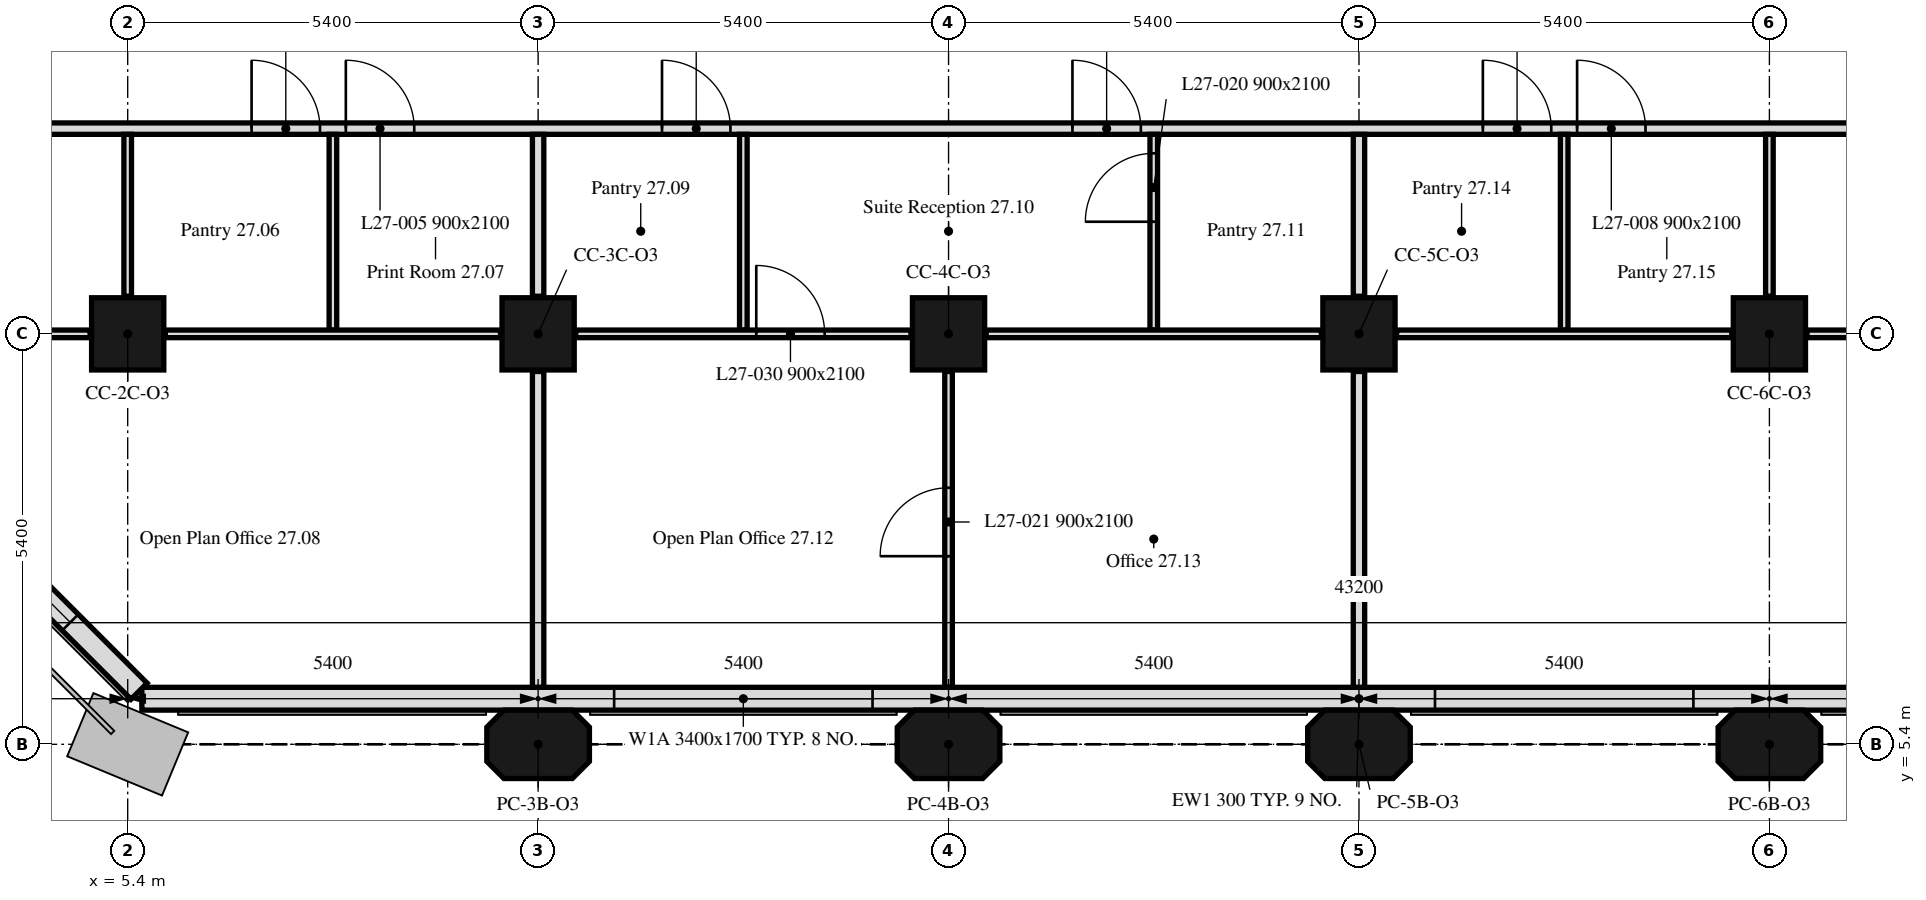
"""IFC4 building model, lengths in metres.
Left out: names, types, materials, properties, quantities, classifications, styles, units other than length and angle.
Written with IfcOpenShell. Run it as: python <this file> out.ifc"""

import sys

from ifc_helpers import new_model, si_unit, direction, frame, frame_2d, origin, origin_2d, place, context, subcontext, project, spatial, polyline, rectangle, outline, extrude, element, fill, save


model = new_model("IFC4")
c1 = context("Model", 3, precision=1e-05, world=origin(), true_north=direction((0.0, 1.0)))
c2 = subcontext(c1, "Body", "Model", "MODEL_VIEW")
j1 = project(units=[si_unit("LENGTHUNIT", "METRE"), si_unit("PLANEANGLEUNIT", "RADIAN")], contexts=[c1])
p1 = place(None, origin())
s1 = spatial("IfcSite", under=j1, at=p1, CompositionType="ELEMENT")
p2 = place(p1, origin())
s2 = spatial("IfcBuilding", under=s1, at=p2, CompositionType="ELEMENT")
p3 = place(p2, frame((0.0, 0.0, 114.4)))
s3 = spatial("IfcBuildingStorey", under=s2, at=p3, CompositionType="ELEMENT", Elevation=114.4)
for number, where, z_axis, x_axis in (
    (1, (10.8, 5.4, 0.0), (0.0, 0.0, 1.0), (1.0, 0.0, 0.0)),
    (2, (16.2, 5.4, 0.0), (0.0, 0.0, 1.0), (1.0, 0.0, 0.0)),
    (3, (21.6, 5.4, 0.0), (0.0, 0.0, 1.0), (1.0, 0.0, 0.0)),
    (4, (27.0, 5.4, 0.0), (0.0, 0.0, 1.0), (1.0, 0.0, 0.0)),
):
    element("IfcColumn", number, at=place(p3, frame(where, z_axis=z_axis, x_axis=x_axis)), inside=s3, PredefinedType="COLUMN", context=c2, shape_type="SweptSolid", body=[
        extrude(outline(polyline([(-0.45, -0.45), (0.45, -0.45), (0.675, -0.225), (0.675, 0.225), (0.45, 0.45), (-0.45, 0.45), (-0.675, 0.225), (-0.675, -0.225), (-0.45, -0.45)])), origin(), (0.0, 0.0, 1.0), 3.5),
    ])
for number, where, z_axis, x_axis in (
    (5, (5.4, 10.8, 0.0), (0.0, 0.0, 1.0), (1.0, 0.0, 0.0)),
    (6, (10.8, 10.8, 0.0), (0.0, 0.0, 1.0), (1.0, 0.0, 0.0)),
    (7, (16.2, 10.8, 0.0), (0.0, 0.0, 1.0), (1.0, 0.0, 0.0)),
    (8, (21.6, 10.8, 0.0), (0.0, 0.0, 1.0), (1.0, 0.0, 0.0)),
    (9, (27.0, 10.8, 0.0), (0.0, 0.0, 1.0), (1.0, 0.0, 0.0)),
):
    element("IfcColumn", number, at=place(p3, frame(where, z_axis=z_axis, x_axis=x_axis)), inside=s3, PredefinedType="COLUMN", context=c2, shape_type="SweptSolid", body=[
        extrude(rectangle(XDim=0.95, YDim=0.95, at=origin_2d()), origin(), (0.0, 0.0, 1.0), 3.5),
    ])
p4 = place(p3, frame((5.586, 6.0, 0.0), z_axis=(0.0, 0.0, 1.0), x_axis=(1.0, 0.0, 0.0)))
e10 = element("IfcWall", 10, at=p4, inside=s3, PredefinedType="SOLIDWALL", context=c2, shape_type="SweptSolid", body=[
    extrude(rectangle(XDim=32.027, YDim=0.3, at=frame_2d((16.014, 0.0))), origin(), (0.0, 0.0, 1.0), 3.5),
])
p5 = place(p4, frame((6.214, 0.0, 0.9)))
e11 = element("IfcOpeningElement", 11, at=p5, cuts=e10, PredefinedType="OPENING", context=c2, shape_type="SweptSolid", body=[
    extrude(rectangle(XDim=3.4, YDim=1.7, at=frame_2d((1.7, 0.85))), frame((0.0, 0.16, 0.0), z_axis=(0.0, -1.0, 0.0), x_axis=(1.0, 0.0, 0.0)), (0.0, 0.0, 1.0), 0.32),
])
p6 = place(p4, frame((17.014, 0.0, 0.9)))
e12 = element("IfcOpeningElement", 12, at=p6, cuts=e10, PredefinedType="OPENING", context=c2, shape_type="SweptSolid", body=[
    extrude(rectangle(XDim=3.4, YDim=1.7, at=frame_2d((1.7, 0.85))), frame((0.0, 0.16, 0.0), z_axis=(0.0, -1.0, 0.0), x_axis=(1.0, 0.0, 0.0)), (0.0, 0.0, 1.0), 0.32),
])
p7 = place(p4, frame((27.814, 0.0, 0.9)))
e13 = element("IfcOpeningElement", 13, at=p7, cuts=e10, PredefinedType="OPENING", context=c2, shape_type="SweptSolid", body=[
    extrude(rectangle(XDim=3.4, YDim=1.7, at=frame_2d((1.7, 0.85))), frame((0.0, 0.16, 0.0), z_axis=(0.0, -1.0, 0.0), x_axis=(1.0, 0.0, 0.0)), (0.0, 0.0, 1.0), 0.32),
])
p8 = place(p3, frame((0.699, 10.949, 0.0), z_axis=(0.0, 0.0, 1.0), x_axis=(0.707106781187, -0.707106781187, 0.0)))
e14 = element("IfcWall", 14, at=p8, inside=s3, PredefinedType="SOLIDWALL", context=c2, shape_type="SweptSolid", body=[
    extrude(rectangle(XDim=6.86, YDim=0.3, at=frame_2d((3.43, 0.0))), origin(), (0.0, 0.0, 1.0), 3.5),
])
p9 = place(p8, frame((1.28, 0.0, 0.9)))
e15 = element("IfcOpeningElement", 15, at=p9, cuts=e14, PredefinedType="OPENING", context=c2, shape_type="SweptSolid", body=[
    extrude(rectangle(XDim=1.1, YDim=1.7, at=frame_2d((0.55, 0.85))), frame((0.0, 0.16, 0.0), z_axis=(0.0, -1.0, 0.0), x_axis=(1.0, 0.0, 0.0)), (0.0, 0.0, 1.0), 0.32),
])
p10 = place(p8, frame((4.48, 0.0, 0.9)))
e16 = element("IfcOpeningElement", 16, at=p10, cuts=e14, PredefinedType="OPENING", context=c2, shape_type="SweptSolid", body=[
    extrude(rectangle(XDim=1.1, YDim=1.7, at=frame_2d((0.55, 0.85))), frame((0.0, 0.16, 0.0), z_axis=(0.0, -1.0, 0.0), x_axis=(1.0, 0.0, 0.0)), (0.0, 0.0, 1.0), 0.32),
])
p11 = place(p3, frame((0.751, 13.5, 0.0), z_axis=(0.0, 0.0, 1.0), x_axis=(1.0, 0.0, 0.0)))
e17 = element("IfcWall", 17, at=p11, inside=s3, PredefinedType="PARTITIONING", context=c2, shape_type="SweptSolid", body=[
    extrude(rectangle(XDim=41.698, YDim=0.15, at=frame_2d((20.849, 0.0))), origin(), (0.0, 0.0, 1.0), 3.5),
])
p12 = place(p11, frame((6.279, 0.0, 0.0)))
e18 = element("IfcOpeningElement", 18, at=p12, cuts=e17, PredefinedType="OPENING", context=c2, shape_type="SweptSolid", body=[
    extrude(rectangle(XDim=0.9, YDim=2.1, at=frame_2d((0.45, 1.05))), frame((0.0, 0.075, 0.0), z_axis=(0.0, -1.0, 0.0), x_axis=(1.0, 0.0, 0.0)), (0.0, 0.0, 1.0), 0.15),
])
p13 = place(p11, frame((7.519, 0.0, 0.0)))
e19 = element("IfcOpeningElement", 19, at=p13, cuts=e17, PredefinedType="OPENING", context=c2, shape_type="SweptSolid", body=[
    extrude(rectangle(XDim=0.9, YDim=2.1, at=frame_2d((0.45, 1.05))), frame((0.0, 0.075, 0.0), z_axis=(0.0, -1.0, 0.0), x_axis=(1.0, 0.0, 0.0)), (0.0, 0.0, 1.0), 0.15),
])
p14 = place(p11, frame((11.679, 0.0, 0.0)))
e20 = element("IfcOpeningElement", 20, at=p14, cuts=e17, PredefinedType="OPENING", context=c2, shape_type="SweptSolid", body=[
    extrude(rectangle(XDim=0.9, YDim=2.1, at=frame_2d((0.45, 1.05))), frame((0.0, 0.075, 0.0), z_axis=(0.0, -1.0, 0.0), x_axis=(1.0, 0.0, 0.0)), (0.0, 0.0, 1.0), 0.15),
])
p15 = place(p11, frame((22.479, 0.0, 0.0)))
e21 = element("IfcOpeningElement", 21, at=p15, cuts=e17, PredefinedType="OPENING", context=c2, shape_type="SweptSolid", body=[
    extrude(rectangle(XDim=0.9, YDim=2.1, at=frame_2d((0.45, 1.05))), frame((0.0, 0.075, 0.0), z_axis=(0.0, -1.0, 0.0), x_axis=(1.0, 0.0, 0.0)), (0.0, 0.0, 1.0), 0.15),
])
p16 = place(p11, frame((23.719, 0.0, 0.0)))
e22 = element("IfcOpeningElement", 22, at=p16, cuts=e17, PredefinedType="OPENING", context=c2, shape_type="SweptSolid", body=[
    extrude(rectangle(XDim=0.9, YDim=2.1, at=frame_2d((0.45, 1.05))), frame((0.0, 0.075, 0.0), z_axis=(0.0, -1.0, 0.0), x_axis=(1.0, 0.0, 0.0)), (0.0, 0.0, 1.0), 0.15),
])
p17 = place(p11, frame((2.174, 0.0, 0.0)))
e23 = element("IfcOpeningElement", 23, at=p17, cuts=e17, PredefinedType="OPENING", context=c2, shape_type="SweptSolid", body=[
    extrude(rectangle(XDim=0.9, YDim=2.1, at=frame_2d((0.45, 1.05))), frame((0.0, 0.075, 0.0), z_axis=(0.0, -1.0, 0.0), x_axis=(1.0, 0.0, 0.0)), (0.0, 0.0, 1.0), 0.15),
])
p18 = place(p11, frame((17.079, 0.0, 0.0)))
e24 = element("IfcOpeningElement", 24, at=p18, cuts=e17, PredefinedType="OPENING", context=c2, shape_type="SweptSolid", body=[
    extrude(rectangle(XDim=0.9, YDim=2.1, at=frame_2d((0.45, 1.05))), frame((0.0, 0.075, 0.0), z_axis=(0.0, -1.0, 0.0), x_axis=(1.0, 0.0, 0.0)), (0.0, 0.0, 1.0), 0.15),
])
p19 = place(p11, frame((34.519, 0.0, 0.0)))
e25 = element("IfcOpeningElement", 25, at=p19, cuts=e17, PredefinedType="OPENING", context=c2, shape_type="SweptSolid", body=[
    extrude(rectangle(XDim=0.9, YDim=2.1, at=frame_2d((0.45, 1.05))), frame((0.0, 0.075, 0.0), z_axis=(0.0, -1.0, 0.0), x_axis=(1.0, 0.0, 0.0)), (0.0, 0.0, 1.0), 0.15),
])
p20 = place(p3, frame((1.112, 10.8, 0.0), z_axis=(0.0, 0.0, 1.0), x_axis=(1.0, 0.0, 0.0)))
e26 = element("IfcWall", 26, at=p20, inside=s3, PredefinedType="PARTITIONING", context=c2, shape_type="SweptSolid", body=[
    extrude(rectangle(XDim=3.793, YDim=0.1, at=frame_2d((1.896, 0.0))), origin(), (0.0, 0.0, 1.0), 3.5),
])
p21 = place(p20, frame((1.813, 0.0, 0.0)))
e27 = element("IfcOpeningElement", 27, at=p21, cuts=e26, PredefinedType="OPENING", context=c2, shape_type="SweptSolid", body=[
    extrude(rectangle(XDim=0.9, YDim=2.1, at=frame_2d((0.45, 1.05))), frame((0.0, 0.05, 0.0), z_axis=(0.0, -1.0, 0.0), x_axis=(1.0, 0.0, 0.0)), (0.0, 0.0, 1.0), 0.1),
])
p22 = place(p3, frame((5.4, 11.295, 0.0), z_axis=(0.0, 0.0, 1.0), x_axis=(0.0, 1.0, 0.0)))
e28 = element("IfcWall", 28, at=p22, inside=s3, PredefinedType="PARTITIONING", context=c2, shape_type="SweptSolid", body=[
    extrude(rectangle(XDim=2.13, YDim=0.1, at=frame_2d((1.065, 0.0))), origin(), (0.0, 0.0, 1.0), 3.5),
])
p23 = place(p3, frame((8.1, 10.85, 0.0), z_axis=(0.0, 0.0, 1.0), x_axis=(0.0, 1.0, 0.0)))
e29 = element("IfcWall", 29, at=p23, inside=s3, PredefinedType="PARTITIONING", context=c2, shape_type="SweptSolid", body=[
    extrude(rectangle(XDim=2.575, YDim=0.1, at=frame_2d((1.288, 0.0))), origin(), (0.0, 0.0, 1.0), 3.5),
])
p24 = place(p3, frame((5.895, 10.8, 0.0), z_axis=(0.0, 0.0, 1.0), x_axis=(1.0, 0.0, 0.0)))
e30 = element("IfcWall", 30, at=p24, inside=s3, PredefinedType="PARTITIONING", context=c2, shape_type="SweptSolid", body=[
    extrude(rectangle(XDim=4.41, YDim=0.1, at=frame_2d((2.205, 0.0))), origin(), (0.0, 0.0, 1.0), 3.5),
])
p25 = place(p3, frame((10.8, 11.295, 0.0), z_axis=(0.0, 0.0, 1.0), x_axis=(0.0, 1.0, 0.0)))
e31 = element("IfcWall", 31, at=p25, inside=s3, PredefinedType="PARTITIONING", context=c2, shape_type="SweptSolid", body=[
    extrude(rectangle(XDim=2.13, YDim=0.15, at=frame_2d((1.065, 0.0))), origin(), (0.0, 0.0, 1.0), 3.5),
])
p26 = place(p3, frame((10.8, 6.151, 0.0), z_axis=(0.0, 0.0, 1.0), x_axis=(0.0, 1.0, 0.0)))
e32 = element("IfcWall", 32, at=p26, inside=s3, PredefinedType="PARTITIONING", context=c2, shape_type="SweptSolid", body=[
    extrude(rectangle(XDim=4.154, YDim=0.15, at=frame_2d((2.077, 0.0))), origin(), (0.0, 0.0, 1.0), 3.5),
])
p27 = place(p3, frame((13.5, 10.85, 0.0), z_axis=(0.0, 0.0, 1.0), x_axis=(0.0, 1.0, 0.0)))
e33 = element("IfcWall", 33, at=p27, inside=s3, PredefinedType="PARTITIONING", context=c2, shape_type="SweptSolid", body=[
    extrude(rectangle(XDim=2.575, YDim=0.1, at=frame_2d((1.288, 0.0))), origin(), (0.0, 0.0, 1.0), 3.5),
])
p28 = place(p3, frame((11.295, 10.8, 0.0), z_axis=(0.0, 0.0, 1.0), x_axis=(1.0, 0.0, 0.0)))
e34 = element("IfcWall", 34, at=p28, inside=s3, PredefinedType="PARTITIONING", context=c2, shape_type="SweptSolid", body=[
    extrude(rectangle(XDim=4.41, YDim=0.1, at=frame_2d((2.205, 0.0))), origin(), (0.0, 0.0, 1.0), 3.5),
])
p29 = place(p28, frame((2.375, 0.0, 0.0)))
e35 = element("IfcOpeningElement", 35, at=p29, cuts=e34, PredefinedType="OPENING", context=c2, shape_type="SweptSolid", body=[
    extrude(rectangle(XDim=0.9, YDim=2.1, at=frame_2d((0.45, 1.05))), frame((0.0, 0.05, 0.0), z_axis=(0.0, -1.0, 0.0), x_axis=(1.0, 0.0, 0.0)), (0.0, 0.0, 1.0), 0.1),
])
p30 = place(p3, frame((18.9, 10.85, 0.0), z_axis=(0.0, 0.0, 1.0), x_axis=(0.0, 1.0, 0.0)))
e36 = element("IfcWall", 36, at=p30, inside=s3, PredefinedType="PARTITIONING", context=c2, shape_type="SweptSolid", body=[
    extrude(rectangle(XDim=2.575, YDim=0.1, at=frame_2d((1.288, 0.0))), origin(), (0.0, 0.0, 1.0), 3.5),
])
p31 = place(p30, frame((1.425, 0.0, 0.0)))
e37 = element("IfcOpeningElement", 37, at=p31, cuts=e36, PredefinedType="OPENING", context=c2, shape_type="SweptSolid", body=[
    extrude(rectangle(XDim=0.9, YDim=2.1, at=frame_2d((0.45, 1.05))), frame((0.0, 0.05, 0.0), z_axis=(0.0, -1.0, 0.0), x_axis=(1.0, 0.0, 0.0)), (0.0, 0.0, 1.0), 0.1),
])
p32 = place(p3, frame((16.695, 10.8, 0.0), z_axis=(0.0, 0.0, 1.0), x_axis=(1.0, 0.0, 0.0)))
e38 = element("IfcWall", 38, at=p32, inside=s3, PredefinedType="PARTITIONING", context=c2, shape_type="SweptSolid", body=[
    extrude(rectangle(XDim=4.41, YDim=0.1, at=frame_2d((2.205, 0.0))), origin(), (0.0, 0.0, 1.0), 3.5),
])
p33 = place(p3, frame((21.6, 11.295, 0.0), z_axis=(0.0, 0.0, 1.0), x_axis=(0.0, 1.0, 0.0)))
e39 = element("IfcWall", 39, at=p33, inside=s3, PredefinedType="PARTITIONING", context=c2, shape_type="SweptSolid", body=[
    extrude(rectangle(XDim=2.13, YDim=0.15, at=frame_2d((1.065, 0.0))), origin(), (0.0, 0.0, 1.0), 3.5),
])
p34 = place(p3, frame((16.2, 6.151, 0.0), z_axis=(0.0, 0.0, 1.0), x_axis=(0.0, 1.0, 0.0)))
e40 = element("IfcWall", 40, at=p34, inside=s3, PredefinedType="PARTITIONING", context=c2, shape_type="SweptSolid", body=[
    extrude(rectangle(XDim=4.154, YDim=0.1, at=frame_2d((2.077, 0.0))), origin(), (0.0, 0.0, 1.0), 3.5),
])
p35 = place(p34, frame((1.724, 0.0, 0.0)))
e41 = element("IfcOpeningElement", 41, at=p35, cuts=e40, PredefinedType="OPENING", context=c2, shape_type="SweptSolid", body=[
    extrude(rectangle(XDim=0.9, YDim=2.1, at=frame_2d((0.45, 1.05))), frame((0.0, 0.05, 0.0), z_axis=(0.0, -1.0, 0.0), x_axis=(1.0, 0.0, 0.0)), (0.0, 0.0, 1.0), 0.1),
])
p36 = place(p3, frame((21.6, 6.151, 0.0), z_axis=(0.0, 0.0, 1.0), x_axis=(0.0, 1.0, 0.0)))
e42 = element("IfcWall", 42, at=p36, inside=s3, PredefinedType="PARTITIONING", context=c2, shape_type="SweptSolid", body=[
    extrude(rectangle(XDim=4.154, YDim=0.15, at=frame_2d((2.077, 0.0))), origin(), (0.0, 0.0, 1.0), 3.5),
])
p37 = place(p3, frame((24.3, 10.85, 0.0), z_axis=(0.0, 0.0, 1.0), x_axis=(0.0, 1.0, 0.0)))
e43 = element("IfcWall", 43, at=p37, inside=s3, PredefinedType="PARTITIONING", context=c2, shape_type="SweptSolid", body=[
    extrude(rectangle(XDim=2.575, YDim=0.1, at=frame_2d((1.288, 0.0))), origin(), (0.0, 0.0, 1.0), 3.5),
])
p38 = place(p3, frame((22.095, 10.8, 0.0), z_axis=(0.0, 0.0, 1.0), x_axis=(1.0, 0.0, 0.0)))
e44 = element("IfcWall", 44, at=p38, inside=s3, PredefinedType="PARTITIONING", context=c2, shape_type="SweptSolid", body=[
    extrude(rectangle(XDim=4.41, YDim=0.1, at=frame_2d((2.205, 0.0))), origin(), (0.0, 0.0, 1.0), 3.5),
])
p39 = place(p3, frame((27.0, 11.295, 0.0), z_axis=(0.0, 0.0, 1.0), x_axis=(0.0, 1.0, 0.0)))
e45 = element("IfcWall", 45, at=p39, inside=s3, PredefinedType="PARTITIONING", context=c2, shape_type="SweptSolid", body=[
    extrude(rectangle(XDim=2.13, YDim=0.1, at=frame_2d((1.065, 0.0))), origin(), (0.0, 0.0, 1.0), 3.5),
])
p40 = place(p3, frame((27.495, 10.8, 0.0), z_axis=(0.0, 0.0, 1.0), x_axis=(1.0, 0.0, 0.0)))
e46 = element("IfcWall", 46, at=p40, inside=s3, PredefinedType="PARTITIONING", context=c2, shape_type="SweptSolid", body=[
    extrude(rectangle(XDim=4.41, YDim=0.1, at=frame_2d((2.205, 0.0))), origin(), (0.0, 0.0, 1.0), 3.5),
])
p41 = place(p40, frame((1.755, 0.0, 0.0)))
e47 = element("IfcOpeningElement", 47, at=p41, cuts=e46, PredefinedType="OPENING", context=c2, shape_type="SweptSolid", body=[
    extrude(rectangle(XDim=0.9, YDim=2.1, at=frame_2d((0.45, 1.05))), frame((0.0, 0.05, 0.0), z_axis=(0.0, -1.0, 0.0), x_axis=(1.0, 0.0, 0.0)), (0.0, 0.0, 1.0), 0.1),
])
p42 = place(p5, origin())
e48 = element("IfcWindow", 48, at=p42, inside=s3, PartitioningType="SINGLE_PANEL", PredefinedType="WINDOW", context=c2, shape_type="SweptSolid", body=[
    extrude(rectangle(XDim=3.4, YDim=1.7, at=frame_2d((1.7, 0.85))), frame((0.0, 0.03, 0.0), z_axis=(0.0, -1.0, 0.0), x_axis=(1.0, 0.0, 0.0)), (0.0, 0.0, 1.0), 0.06),
])
fill(e11, e48)
p43 = place(p6, origin())
e49 = element("IfcWindow", 49, at=p43, inside=s3, PartitioningType="SINGLE_PANEL", PredefinedType="WINDOW", context=c2, shape_type="SweptSolid", body=[
    extrude(rectangle(XDim=3.4, YDim=1.7, at=frame_2d((1.7, 0.85))), frame((0.0, 0.03, 0.0), z_axis=(0.0, -1.0, 0.0), x_axis=(1.0, 0.0, 0.0)), (0.0, 0.0, 1.0), 0.06),
])
fill(e12, e49)
p44 = place(p10, origin())
e50 = element("IfcWindow", 50, at=p44, inside=s3, PartitioningType="SINGLE_PANEL", PredefinedType="WINDOW", context=c2, shape_type="SweptSolid", body=[
    extrude(rectangle(XDim=1.1, YDim=1.7, at=frame_2d((0.55, 0.85))), frame((0.0, 0.03, 0.0), z_axis=(0.0, -1.0, 0.0), x_axis=(1.0, 0.0, 0.0)), (0.0, 0.0, 1.0), 0.06),
])
fill(e16, e50)
p45 = place(p12, origin())
e51 = element("IfcDoor", 51, at=p45, inside=s3, OperationType="SINGLE_SWING_LEFT", PredefinedType="DOOR", context=c2, shape_type="SweptSolid", body=[
    extrude(rectangle(XDim=0.9, YDim=2.1, at=frame_2d((0.45, 1.05))), frame((0.0, 0.025, 0.0), z_axis=(0.0, -1.0, 0.0), x_axis=(1.0, 0.0, 0.0)), (0.0, 0.0, 1.0), 0.05),
])
fill(e18, e51)
p46 = place(p13, origin())
e52 = element("IfcDoor", 52, at=p46, inside=s3, OperationType="SINGLE_SWING_LEFT", PredefinedType="DOOR", context=c2, shape_type="SweptSolid", body=[
    extrude(rectangle(XDim=0.9, YDim=2.1, at=frame_2d((0.45, 1.05))), frame((0.0, 0.025, 0.0), z_axis=(0.0, -1.0, 0.0), x_axis=(1.0, 0.0, 0.0)), (0.0, 0.0, 1.0), 0.05),
])
fill(e19, e52)
p47 = place(p14, origin())
e53 = element("IfcDoor", 53, at=p47, inside=s3, OperationType="SINGLE_SWING_LEFT", PredefinedType="DOOR", context=c2, shape_type="SweptSolid", body=[
    extrude(rectangle(XDim=0.9, YDim=2.1, at=frame_2d((0.45, 1.05))), frame((0.0, 0.025, 0.0), z_axis=(0.0, -1.0, 0.0), x_axis=(1.0, 0.0, 0.0)), (0.0, 0.0, 1.0), 0.05),
])
fill(e20, e53)
p48 = place(p15, origin())
e54 = element("IfcDoor", 54, at=p48, inside=s3, OperationType="SINGLE_SWING_LEFT", PredefinedType="DOOR", context=c2, shape_type="SweptSolid", body=[
    extrude(rectangle(XDim=0.9, YDim=2.1, at=frame_2d((0.45, 1.05))), frame((0.0, 0.025, 0.0), z_axis=(0.0, -1.0, 0.0), x_axis=(1.0, 0.0, 0.0)), (0.0, 0.0, 1.0), 0.05),
])
fill(e21, e54)
p49 = place(p16, origin())
e55 = element("IfcDoor", 55, at=p49, inside=s3, OperationType="SINGLE_SWING_LEFT", PredefinedType="DOOR", context=c2, shape_type="SweptSolid", body=[
    extrude(rectangle(XDim=0.9, YDim=2.1, at=frame_2d((0.45, 1.05))), frame((0.0, 0.025, 0.0), z_axis=(0.0, -1.0, 0.0), x_axis=(1.0, 0.0, 0.0)), (0.0, 0.0, 1.0), 0.05),
])
fill(e22, e55)
p50 = place(p31, origin())
e56 = element("IfcDoor", 56, at=p50, inside=s3, OperationType="SINGLE_SWING_RIGHT", PredefinedType="DOOR", context=c2, shape_type="SweptSolid", body=[
    extrude(rectangle(XDim=0.9, YDim=2.1, at=frame_2d((0.45, 1.05))), frame((0.0, 0.025, 0.0), z_axis=(0.0, -1.0, 0.0), x_axis=(1.0, 0.0, 0.0)), (0.0, 0.0, 1.0), 0.05),
])
fill(e37, e56)
p51 = place(p35, origin())
e57 = element("IfcDoor", 57, at=p51, inside=s3, OperationType="SINGLE_SWING_RIGHT", PredefinedType="DOOR", context=c2, shape_type="SweptSolid", body=[
    extrude(rectangle(XDim=0.9, YDim=2.1, at=frame_2d((0.45, 1.05))), frame((0.0, 0.025, 0.0), z_axis=(0.0, -1.0, 0.0), x_axis=(1.0, 0.0, 0.0)), (0.0, 0.0, 1.0), 0.05),
])
fill(e41, e57)
p52 = place(p29, origin())
e58 = element("IfcDoor", 58, at=p52, inside=s3, OperationType="SINGLE_SWING_LEFT", PredefinedType="DOOR", context=c2, shape_type="SweptSolid", body=[
    extrude(rectangle(XDim=0.9, YDim=2.1, at=frame_2d((0.45, 1.05))), frame((0.0, 0.025, 0.0), z_axis=(0.0, -1.0, 0.0), x_axis=(1.0, 0.0, 0.0)), (0.0, 0.0, 1.0), 0.05),
])
fill(e35, e58)
p53 = place(p18, origin())
e59 = element("IfcDoor", 59, at=p53, inside=s3, OperationType="SINGLE_SWING_LEFT", PredefinedType="DOOR", context=c2, shape_type="SweptSolid", body=[
    extrude(rectangle(XDim=0.9, YDim=2.1, at=frame_2d((0.45, 1.05))), frame((0.0, 0.025, 0.0), z_axis=(0.0, -1.0, 0.0), x_axis=(1.0, 0.0, 0.0)), (0.0, 0.0, 1.0), 0.05),
])
fill(e24, e59)
save(model, sys.argv[1])
